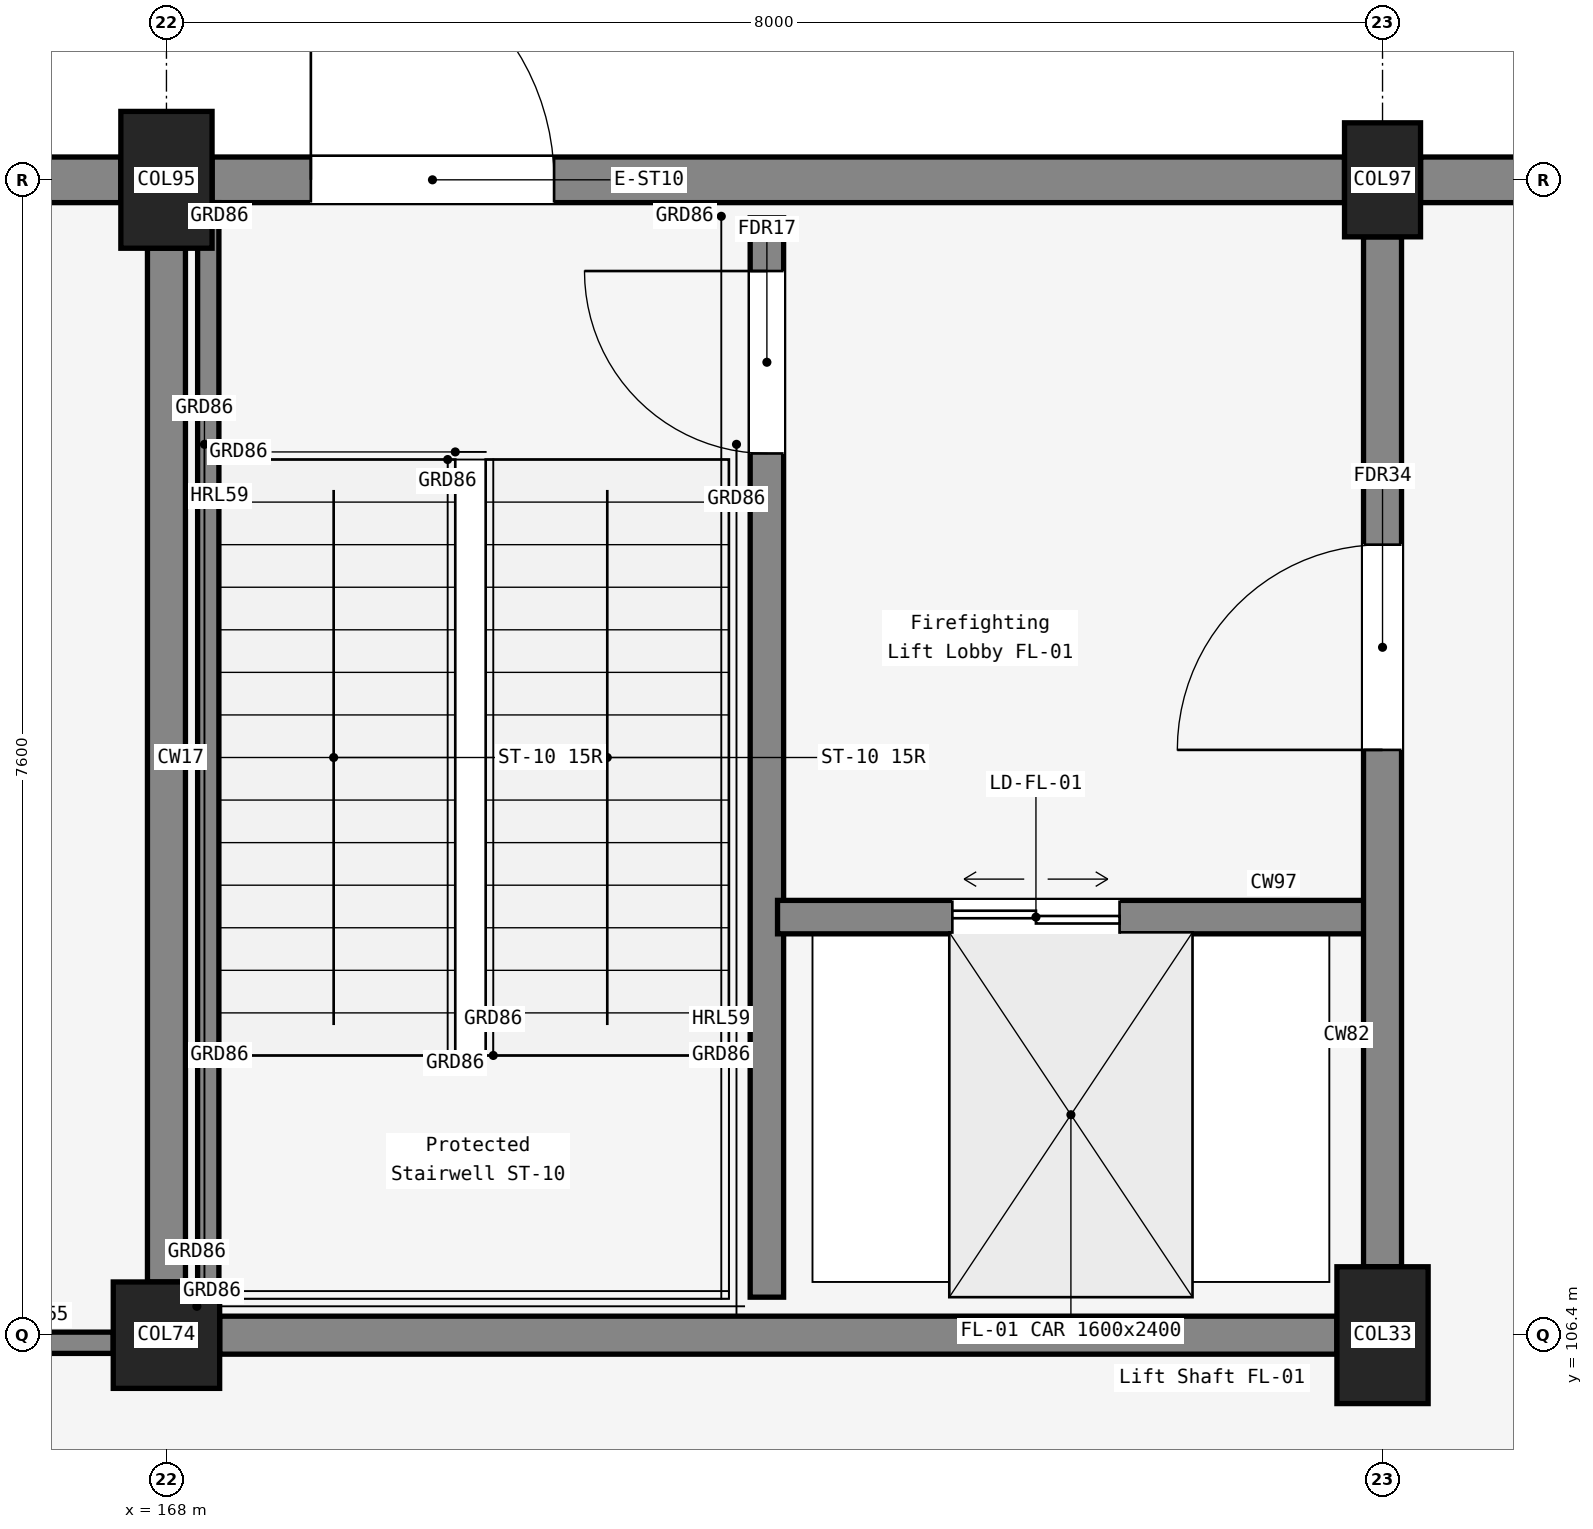
"""IFC4 building model, lengths in metres.
Left out: names, types, materials, properties, quantities, classifications, styles, units other than length and angle.
Written with IfcOpenShell. Run it as: python <this file> out.ifc"""

import sys

from ifc_helpers import new_model, si_unit, direction, frame, frame_2d, origin, origin_2d, place, context, subcontext, project, spatial, rectangle, extrude, element, fill, save


model = new_model("IFC4")
c1 = context("Model", 3, precision=1e-05, world=origin(), true_north=direction((0.0, 1.0)))
c2 = subcontext(c1, "Body", "Model", "MODEL_VIEW")
j1 = project(units=[si_unit("LENGTHUNIT", "METRE"), si_unit("PLANEANGLEUNIT", "RADIAN")], contexts=[c1])
p1 = place(None, origin())
s1 = spatial("IfcSite", under=j1, at=p1, CompositionType="ELEMENT")
p2 = place(p1, origin())
s2 = spatial("IfcBuilding", under=s1, at=p2, CompositionType="ELEMENT")
p3 = place(p2, frame((0.0, 0.0, -5.4)))
s3 = spatial("IfcBuildingStorey", under=s2, at=p3, CompositionType="ELEMENT", Elevation=-5.4)
for number, where, z_axis, x_axis in (
    (1, (168.0, 114.0, 0.0), (0.0, 0.0, 1.0), (-1.0, 0.0, 0.0)),
    (2, (176.0, 114.0, 0.0), (0.0, 0.0, 1.0), (-1.0, 0.0, 0.0)),
    (3, (184.0, 114.0, 0.0), (0.0, 0.0, 1.0), (-1.0, 0.0, 0.0)),
):
    element("IfcWall", number, at=place(p3, frame(where, z_axis=z_axis, x_axis=x_axis)), inside=s3, PredefinedType="USERDEFINED", context=c2, shape_type="SweptSolid", body=[
        extrude(rectangle(XDim=8.0, YDim=0.4, at=frame_2d((4.0, 0.0))), origin(), (0.0, 0.0, 1.0), 5.08),
    ])
p4 = place(p3, frame((168.0, 106.4, 0.0), z_axis=(0.0, 0.0, 1.0), x_axis=(1.0, 0.0, 0.0)))
e4 = element("IfcColumn", 4, at=p4, inside=s3, PredefinedType="COLUMN", context=c2, shape_type="SweptSolid", body=[
    extrude(rectangle(XDim=0.8, YDim=0.8, at=origin_2d()), origin(), (0.0, 0.0, 1.0), 5.4),
])
for number, where, z_axis, x_axis in (
    (5, (168.0, 114.0, 0.0), (0.0, 0.0, 1.0), (1.0, 0.0, 0.0)),
    (6, (176.0, 106.4, 0.0), (0.0, 0.0, 1.0), (1.0, 0.0, 0.0)),
):
    element("IfcColumn", number, at=place(p3, frame(where, z_axis=z_axis, x_axis=x_axis)), inside=s3, PredefinedType="COLUMN", context=c2, shape_type="SweptSolid", body=[
        extrude(rectangle(XDim=0.7, YDim=0.7, at=origin_2d()), origin(), (0.0, 0.0, 1.0), 5.4),
    ])
p5 = place(p3, frame((176.0, 114.0, 0.0), z_axis=(0.0, 0.0, 1.0), x_axis=(1.0, 0.0, 0.0)))
e7 = element("IfcColumn", 7, at=p5, inside=s3, PredefinedType="COLUMN", context=c2, shape_type="SweptSolid", body=[
    extrude(rectangle(XDim=0.6, YDim=0.9, at=origin_2d()), origin(), (0.0, 0.0, 1.0), 5.4),
])
p6 = place(p3, frame((168.0, 106.8, 0.0), z_axis=(0.0, 0.0, 1.0), x_axis=(0.0, 1.0, 0.0)))
e8 = element("IfcWall", 8, at=p6, inside=s3, PredefinedType="SOLIDWALL", context=c2, shape_type="SweptSolid", body=[
    extrude(rectangle(XDim=6.85, YDim=0.25, at=frame_2d((3.425, 0.0))), origin(), (0.0, 0.0, 1.0), 4.205),
])
p7 = place(p3, frame((168.4, 106.4, 0.0), z_axis=(0.0, 0.0, 1.0), x_axis=(1.0, 0.0, 0.0)))
e9 = element("IfcWall", 9, at=p7, inside=s3, PredefinedType="SOLIDWALL", context=c2, shape_type="SweptSolid", body=[
    extrude(rectangle(XDim=7.25, YDim=0.25, at=frame_2d((3.625, 0.0))), origin(), (0.0, 0.0, 1.0), 4.205),
])
p8 = place(p3, frame((171.95, 106.65, 0.0), z_axis=(0.0, 0.0, 1.0), x_axis=(0.0, 1.0, 0.0)))
e10 = element("IfcWall", 10, at=p8, inside=s3, PredefinedType="SOLIDWALL", context=c2, shape_type="SweptSolid", body=[
    extrude(rectangle(XDim=7.1, YDim=0.22, at=frame_2d((3.55, 0.0))), origin(), (0.0, 0.0, 1.0), 5.08),
])
p9 = place(p8, frame((5.55, 0.0, 0.0)))
e11 = element("IfcOpeningElement", 11, at=p9, cuts=e10, PredefinedType="OPENING", context=c2, shape_type="SweptSolid", body=[
    extrude(rectangle(XDim=1.2, YDim=2.15, at=frame_2d((0.6, 1.075))), frame((0.0, 0.12, 0.0), z_axis=(0.0, -1.0, 0.0), x_axis=(1.0, 0.0, 0.0)), (0.0, 0.0, 1.0), 0.24),
])
p10 = place(p3, frame((172.02, 109.15, 0.0), z_axis=(0.0, 0.0, 1.0), x_axis=(1.0, 0.0, 0.0)))
e12 = element("IfcWall", 12, at=p10, inside=s3, PredefinedType="SOLIDWALL", context=c2, shape_type="SweptSolid", body=[
    extrude(rectangle(XDim=3.93, YDim=0.22, at=frame_2d((1.965, 0.0))), origin(), (0.0, 0.0, 1.0), 4.455),
])
p11 = place(p10, frame((1.15, 0.0, 0.0)))
e13 = element("IfcOpeningElement", 13, at=p11, cuts=e12, PredefinedType="OPENING", context=c2, shape_type="SweptSolid", body=[
    extrude(rectangle(XDim=1.1, YDim=2.2, at=frame_2d((0.55, 1.1))), frame((0.0, 0.12, 0.0), z_axis=(0.0, -1.0, 0.0), x_axis=(1.0, 0.0, 0.0)), (0.0, 0.0, 1.0), 0.24),
])
p12 = place(p3, frame((176.0, 106.75, 0.0), z_axis=(0.0, 0.0, 1.0), x_axis=(0.0, 1.0, 0.0)))
e14 = element("IfcWall", 14, at=p12, inside=s3, PredefinedType="SOLIDWALL", context=c2, shape_type="SweptSolid", body=[
    extrude(rectangle(XDim=6.8, YDim=0.25, at=frame_2d((3.4, 0.0))), origin(), (0.0, 0.0, 1.0), 4.205),
])
p13 = place(p12, frame((3.5, 0.0, 0.0)))
e15 = element("IfcOpeningElement", 15, at=p13, cuts=e14, PredefinedType="OPENING", context=c2, shape_type="SweptSolid", body=[
    extrude(rectangle(XDim=1.35, YDim=2.2, at=frame_2d((0.675, 1.1))), frame((0.0, 0.135, 0.0), z_axis=(0.0, -1.0, 0.0), x_axis=(1.0, 0.0, 0.0)), (0.0, 0.0, 1.0), 0.27),
])
p14 = place(p3, frame((165.116, 106.35, 0.0), z_axis=(0.0, 0.0, 1.0), x_axis=(1.0, 0.0, 0.0)))
e16 = element("IfcWall", 16, at=p14, inside=s3, PredefinedType="PARTITIONING", context=c2, shape_type="SweptSolid", body=[
    extrude(rectangle(XDim=2.484, YDim=0.14, at=frame_2d((1.242, 0.0))), origin(), (0.0, 0.0, 1.0), 4.22),
])
p15 = place(p14, frame((0.22, 0.0, 0.0)))
e17 = element("IfcOpeningElement", 17, at=p15, cuts=e16, PredefinedType="OPENING", context=c2, shape_type="SweptSolid", body=[
    extrude(rectangle(XDim=1.34, YDim=2.2, at=frame_2d((0.67, 1.1))), frame((0.0, 0.08, 0.0), z_axis=(0.0, -1.0, 0.0), x_axis=(1.0, 0.0, 0.0)), (0.0, 0.0, 1.0), 0.16),
])
p16 = place(p3, frame((168.275, 106.55, 0.0), z_axis=(0.0, 0.0, 1.0), x_axis=(0.0, 1.0, 0.0)))
e18 = element("IfcWall", 18, at=p16, inside=s3, PredefinedType="SOLIDWALL", context=c2, shape_type="SweptSolid", body=[
    extrude(rectangle(XDim=7.3, YDim=0.14, at=frame_2d((3.65, 0.0))), origin(), (0.0, 0.0, 1.0), 5.08),
])
p17 = place(p9, origin())
e19 = element("IfcDoor", 19, at=p17, inside=s3, OperationType="SINGLE_SWING_RIGHT", PredefinedType="DOOR", context=c2, shape_type="SweptSolid", body=[
    extrude(rectangle(XDim=1.2, YDim=2.15, at=frame_2d((0.6, 1.075))), frame((0.0, 0.025, 0.0), z_axis=(0.0, -1.0, 0.0), x_axis=(1.0, 0.0, 0.0)), (0.0, 0.0, 1.0), 0.05),
])
fill(e11, e19)
p18 = place(p11, origin())
e20 = element("IfcDoor", 20, at=p18, inside=s3, OperationType="DOUBLE_DOOR_SLIDING", PredefinedType="DOOR", context=c2, shape_type="SweptSolid", body=[
    extrude(rectangle(XDim=1.1, YDim=2.2, at=frame_2d((0.55, 1.1))), frame((0.0, 0.025, 0.0), z_axis=(0.0, -1.0, 0.0), x_axis=(1.0, 0.0, 0.0)), (0.0, 0.0, 1.0), 0.05),
])
fill(e13, e20)
p19 = place(p13, origin())
e21 = element("IfcDoor", 21, at=p19, inside=s3, OperationType="SINGLE_SWING_LEFT", PredefinedType="DOOR", context=c2, shape_type="SweptSolid", body=[
    extrude(rectangle(XDim=1.35, YDim=2.2, at=frame_2d((0.675, 1.1))), frame((0.0, 0.025, 0.0), z_axis=(0.0, -1.0, 0.0), x_axis=(1.0, 0.0, 0.0)), (0.0, 0.0, 1.0), 0.05),
])
fill(e15, e21)
save(model, sys.argv[1])
